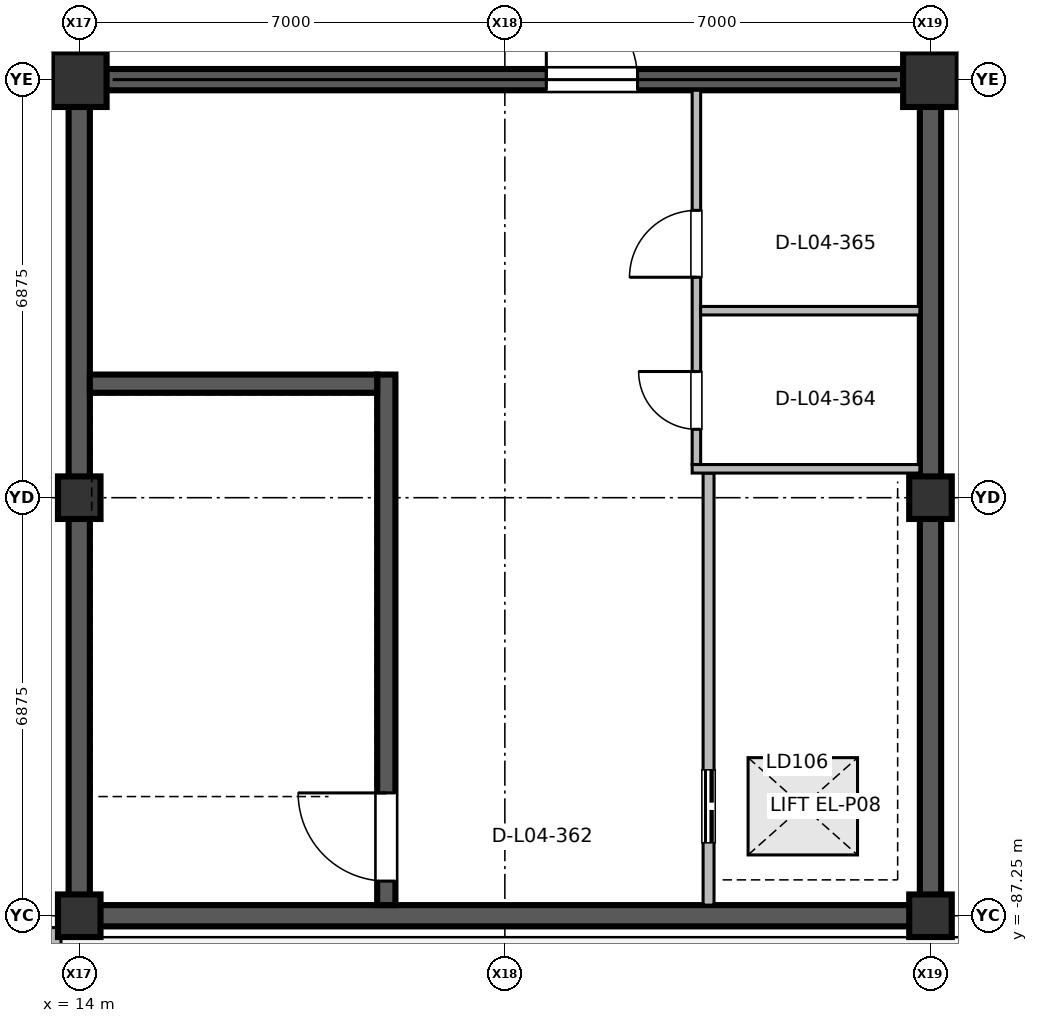
"""IFC4 building model, lengths in metres.
Left out: names, types, materials, properties, quantities, classifications, styles, units other than length and angle.
Written with IfcOpenShell. Run it as: python <this file> out.ifc"""

import sys

from ifc_helpers import new_model, si_unit, direction, frame, frame_2d, origin, origin_2d, place, context, subcontext, project, spatial, rectangle, extrude, element, fill, save


model = new_model("IFC4")
c1 = context("Model", 3, precision=1e-05, world=origin(), true_north=direction((0.0, 1.0)))
c2 = subcontext(c1, "Body", "Model", "MODEL_VIEW")
j1 = project(units=[si_unit("LENGTHUNIT", "METRE"), si_unit("PLANEANGLEUNIT", "RADIAN")], contexts=[c1])
p1 = place(None, origin())
s1 = spatial("IfcSite", under=j1, at=p1, CompositionType="ELEMENT")
p2 = place(p1, origin())
s2 = spatial("IfcBuilding", under=s1, at=p2, CompositionType="ELEMENT")
p3 = place(p2, frame((0.0, 0.0, 16.2)))
s3 = spatial("IfcBuildingStorey", under=s2, at=p3, CompositionType="ELEMENT", Elevation=16.2)
for number, where, z_axis, x_axis in (
    (1, (14.0, -87.25, 0.0), (0.0, 0.0, 1.0), (1.0, 0.0, 0.0)),
    (2, (14.0, -80.375, 0.0), (0.0, 0.0, 1.0), (1.0, 0.0, 0.0)),
):
    element("IfcColumn", number, at=place(p3, frame(where, z_axis=z_axis, x_axis=x_axis)), inside=s3, PredefinedType="COLUMN", context=c2, shape_type="SweptSolid", body=[
        extrude(rectangle(XDim=0.7, YDim=0.7, at=origin_2d()), origin(), (0.0, 0.0, 1.0), 4.595),
    ])
p4 = place(p3, frame((14.0, -73.5, 0.0), z_axis=(0.0, 0.0, 1.0), x_axis=(1.0, 0.0, 0.0)))
e3 = element("IfcColumn", 3, at=p4, inside=s3, PredefinedType="COLUMN", context=c2, shape_type="SweptSolid", body=[
    extrude(rectangle(XDim=0.9, YDim=0.9, at=origin_2d()), origin(), (0.0, 0.0, 1.0), 4.595),
])
for number, where, z_axis, x_axis in (
    (4, (28.0, -87.25, 0.0), (0.0, 0.0, 1.0), (1.0, 0.0, 0.0)),
    (5, (28.0, -80.375, 0.0), (0.0, 0.0, 1.0), (1.0, 0.0, 0.0)),
):
    element("IfcColumn", number, at=place(p3, frame(where, z_axis=z_axis, x_axis=x_axis)), inside=s3, PredefinedType="COLUMN", context=c2, shape_type="SweptSolid", body=[
        extrude(rectangle(XDim=0.7, YDim=0.7, at=origin_2d()), origin(), (0.0, 0.0, 1.0), 4.595),
    ])
p5 = place(p3, frame((28.0, -73.5, 0.0), z_axis=(0.0, 0.0, 1.0), x_axis=(1.0, 0.0, 0.0)))
e6 = element("IfcColumn", 6, at=p5, inside=s3, PredefinedType="COLUMN", context=c2, shape_type="SweptSolid", body=[
    extrude(rectangle(XDim=0.9, YDim=0.9, at=origin_2d()), origin(), (0.0, 0.0, 1.0), 4.595),
])
for number, where, z_axis, x_axis in (
    (7, (14.0, -87.075, 0.0), (0.0, 0.0, 1.0), (0.0, 1.0, 0.0)),
    (8, (28.0, -87.075, 0.0), (0.0, 0.0, 1.0), (0.0, 1.0, 0.0)),
):
    element("IfcWall", number, at=place(p3, frame(where, z_axis=z_axis, x_axis=x_axis)), inside=s3, PredefinedType="SHEAR", context=c2, shape_type="SweptSolid", body=[
        extrude(rectangle(XDim=13.4, YDim=0.35, at=frame_2d((6.7, 0.0))), origin(), (0.0, 0.0, 1.0), 4.595),
    ])
p6 = place(p3, frame((14.175, -87.25, 0.0), z_axis=(0.0, 0.0, 1.0), x_axis=(1.0, 0.0, 0.0)))
e9 = element("IfcWall", 9, at=p6, inside=s3, PredefinedType="SHEAR", context=c2, shape_type="SweptSolid", body=[
    extrude(rectangle(XDim=13.65, YDim=0.35, at=frame_2d((6.825, 0.0))), origin(), (0.0, 0.0, 1.0), 4.595),
])
p7 = place(p3, frame((14.175, -73.5, 0.0), z_axis=(0.0, 0.0, 1.0), x_axis=(1.0, 0.0, 0.0)))
e10 = element("IfcWall", 10, at=p7, inside=s3, PredefinedType="SHEAR", context=c2, shape_type="SweptSolid", body=[
    extrude(rectangle(XDim=13.65, YDim=0.35, at=frame_2d((6.825, 0.0))), origin(), (0.0, 0.0, 1.0), 4.595),
])
p8 = place(p7, frame((7.507, 0.0, 0.0)))
e11 = element("IfcOpeningElement", 11, at=p8, cuts=e10, PredefinedType="OPENING", context=c2, shape_type="SweptSolid", body=[
    extrude(rectangle(XDim=1.5, YDim=2.2, at=frame_2d((0.75, 1.1))), frame((0.0, 0.185, 0.0), z_axis=(0.0, -1.0, 0.0), x_axis=(1.0, 0.0, 0.0)), (0.0, 0.0, 1.0), 0.37),
])
p9 = place(p3, frame((0.3, -87.6, 0.0), z_axis=(0.0, 0.0, 1.0), x_axis=(1.0, 0.0, 0.0)))
e12 = element("IfcWall", 12, at=p9, inside=s3, PredefinedType="SOLIDWALL", context=c2, shape_type="SweptSolid", body=[
    extrude(rectangle(XDim=13.4, YDim=0.31, at=frame_2d((6.7, 0.0))), origin(), (0.0, 0.0, 1.0), 3.47),
])
p10 = place(p9, frame((1.2, 0.0, 0.0)))
e13 = element("IfcOpeningElement", 13, at=p10, cuts=e12, PredefinedType="OPENING", context=c2, shape_type="SweptSolid", body=[
    extrude(rectangle(XDim=2.1, YDim=2.4, at=frame_2d((1.05, 1.2))), frame((0.0, 0.165, 0.0), z_axis=(0.0, -1.0, 0.0), x_axis=(1.0, 0.0, 0.0)), (0.0, 0.0, 1.0), 0.33),
])
p11 = place(p9, frame((4.2, 0.0, 0.9)))
e14 = element("IfcOpeningElement", 14, at=p11, cuts=e12, PredefinedType="OPENING", context=c2, shape_type="SweptSolid", body=[
    extrude(rectangle(XDim=1.6, YDim=1.7, at=frame_2d((0.8, 0.85))), frame((0.0, 0.165, 0.0), z_axis=(0.0, -1.0, 0.0), x_axis=(1.0, 0.0, 0.0)), (0.0, 0.0, 1.0), 0.33),
])
p12 = place(p9, frame((6.65, 0.0, 0.9)))
e15 = element("IfcOpeningElement", 15, at=p12, cuts=e12, PredefinedType="OPENING", context=c2, shape_type="SweptSolid", body=[
    extrude(rectangle(XDim=1.7, YDim=1.85, at=frame_2d((0.85, 0.925))), frame((0.0, 0.165, 0.0), z_axis=(0.0, -1.0, 0.0), x_axis=(1.0, 0.0, 0.0)), (0.0, 0.0, 1.0), 0.33),
])
p13 = place(p3, frame((19.05, -87.075, 0.0), z_axis=(0.0, 0.0, 1.0), x_axis=(0.0, 1.0, 0.0)))
e16 = element("IfcWall", 16, at=p13, inside=s3, PredefinedType="SHEAR", context=c2, shape_type="SweptSolid", body=[
    extrude(rectangle(XDim=8.725, YDim=0.3, at=frame_2d((4.362, 0.0))), origin(), (0.0, 0.0, 1.0), 4.595),
])
p14 = place(p13, frame((0.395, 0.0, 0.0)))
e17 = element("IfcOpeningElement", 17, at=p14, cuts=e16, PredefinedType="OPENING", context=c2, shape_type="SweptSolid", body=[
    extrude(rectangle(XDim=1.45, YDim=2.2, at=frame_2d((0.725, 1.1))), frame((0.0, 0.16, 0.0), z_axis=(0.0, -1.0, 0.0), x_axis=(1.0, 0.0, 0.0)), (0.0, 0.0, 1.0), 0.32),
])
p15 = place(p3, frame((24.35, -87.075, 0.0), z_axis=(0.0, 0.0, 1.0), x_axis=(0.0, 1.0, 0.0)))
e18 = element("IfcWall", 18, at=p15, inside=s3, PredefinedType="PARTITIONING", context=c2, shape_type="SweptSolid", body=[
    extrude(rectangle(XDim=7.105, YDim=0.18, at=frame_2d((3.552, 0.0))), origin(), (0.0, 0.0, 1.0), 3.82),
])
p16 = place(p15, frame((1.025, 0.0, 0.0)))
e19 = element("IfcOpeningElement", 19, at=p16, cuts=e18, PredefinedType="OPENING", context=c2, shape_type="SweptSolid", body=[
    extrude(rectangle(XDim=1.2, YDim=2.25, at=frame_2d((0.6, 1.125))), frame((0.0, 0.1, 0.0), z_axis=(0.0, -1.0, 0.0), x_axis=(1.0, 0.0, 0.0)), (0.0, 0.0, 1.0), 0.2),
])
p17 = place(p3, frame((24.15, -79.83, 0.0), z_axis=(0.0, 0.0, 1.0), x_axis=(0.0, 1.0, 0.0)))
e20 = element("IfcWall", 20, at=p17, inside=s3, PredefinedType="PARTITIONING", context=c2, shape_type="SweptSolid", body=[
    extrude(rectangle(XDim=6.155, YDim=0.14, at=frame_2d((3.078, 0.0))), origin(), (0.0, 0.0, 1.0), 3.82),
])
p18 = place(p17, frame((0.58, 0.0, 0.0)))
e21 = element("IfcOpeningElement", 21, at=p18, cuts=e20, PredefinedType="OPENING", context=c2, shape_type="SweptSolid", body=[
    extrude(rectangle(XDim=0.95, YDim=2.15, at=frame_2d((0.475, 1.075))), frame((0.0, 0.08, 0.0), z_axis=(0.0, -1.0, 0.0), x_axis=(1.0, 0.0, 0.0)), (0.0, 0.0, 1.0), 0.16),
])
p19 = place(p17, frame((3.08, 0.0, 0.0)))
e22 = element("IfcOpeningElement", 22, at=p19, cuts=e20, PredefinedType="OPENING", context=c2, shape_type="SweptSolid", body=[
    extrude(rectangle(XDim=1.1, YDim=2.15, at=frame_2d((0.55, 1.075))), frame((0.0, 0.08, 0.0), z_axis=(0.0, -1.0, 0.0), x_axis=(1.0, 0.0, 0.0)), (0.0, 0.0, 1.0), 0.16),
])
p20 = place(p3, frame((24.08, -79.9, 0.0), z_axis=(0.0, 0.0, 1.0), x_axis=(1.0, 0.0, 0.0)))
e23 = element("IfcWall", 23, at=p20, inside=s3, PredefinedType="PARTITIONING", context=c2, shape_type="SweptSolid", body=[
    extrude(rectangle(XDim=3.745, YDim=0.14, at=frame_2d((1.873, 0.0))), origin(), (0.0, 0.0, 1.0), 3.82),
])
p21 = place(p3, frame((24.22, -77.3, 0.0), z_axis=(0.0, 0.0, 1.0), x_axis=(1.0, 0.0, 0.0)))
e24 = element("IfcWall", 24, at=p21, inside=s3, PredefinedType="PARTITIONING", context=c2, shape_type="SweptSolid", body=[
    extrude(rectangle(XDim=3.605, YDim=0.14, at=frame_2d((1.802, 0.0))), origin(), (0.0, 0.0, 1.0), 3.82),
])
p22 = place(p3, frame((14.175, -78.5, 0.0), z_axis=(0.0, 0.0, 1.0), x_axis=(1.0, 0.0, 0.0)))
e25 = element("IfcWall", 25, at=p22, inside=s3, PredefinedType="SHEAR", context=c2, shape_type="SweptSolid", body=[
    extrude(rectangle(XDim=4.725, YDim=0.3, at=frame_2d((2.362, 0.0))), origin(), (0.0, 0.0, 1.0), 4.595),
])
p23 = place(p8, origin())
e26 = element("IfcDoor", 26, at=p23, inside=s3, OperationType="SINGLE_SWING_LEFT", PredefinedType="DOOR", context=c2, shape_type="SweptSolid", body=[
    extrude(rectangle(XDim=1.5, YDim=2.2, at=frame_2d((0.75, 1.1))), frame((0.0, 0.025, 0.0), z_axis=(0.0, -1.0, 0.0), x_axis=(1.0, 0.0, 0.0)), (0.0, 0.0, 1.0), 0.05),
])
fill(e11, e26)
p24 = place(p14, origin())
e27 = element("IfcDoor", 27, at=p24, inside=s3, OperationType="SINGLE_SWING_RIGHT", PredefinedType="DOOR", context=c2, shape_type="SweptSolid", body=[
    extrude(rectangle(XDim=1.45, YDim=2.2, at=frame_2d((0.725, 1.1))), frame((0.0, 0.025, 0.0), z_axis=(0.0, -1.0, 0.0), x_axis=(1.0, 0.0, 0.0)), (0.0, 0.0, 1.0), 0.05),
])
fill(e17, e27)
p25 = place(p16, origin())
e28 = element("IfcDoor", 28, at=p25, inside=s3, OperationType="DOUBLE_DOOR_SLIDING", PredefinedType="DOOR", context=c2, shape_type="SweptSolid", body=[
    extrude(rectangle(XDim=1.2, YDim=2.25, at=frame_2d((0.6, 1.125))), frame((0.0, 0.025, 0.0), z_axis=(0.0, -1.0, 0.0), x_axis=(1.0, 0.0, 0.0)), (0.0, 0.0, 1.0), 0.05),
])
fill(e19, e28)
p26 = place(p18, origin())
e29 = element("IfcDoor", 29, at=p26, inside=s3, OperationType="SINGLE_SWING_RIGHT", PredefinedType="DOOR", context=c2, shape_type="SweptSolid", body=[
    extrude(rectangle(XDim=0.95, YDim=2.15, at=frame_2d((0.475, 1.075))), frame((0.0, 0.025, 0.0), z_axis=(0.0, -1.0, 0.0), x_axis=(1.0, 0.0, 0.0)), (0.0, 0.0, 1.0), 0.05),
])
fill(e21, e29)
p27 = place(p19, origin())
e30 = element("IfcDoor", 30, at=p27, inside=s3, OperationType="SINGLE_SWING_LEFT", PredefinedType="DOOR", context=c2, shape_type="SweptSolid", body=[
    extrude(rectangle(XDim=1.1, YDim=2.15, at=frame_2d((0.55, 1.075))), frame((0.0, 0.025, 0.0), z_axis=(0.0, -1.0, 0.0), x_axis=(1.0, 0.0, 0.0)), (0.0, 0.0, 1.0), 0.05),
])
fill(e22, e30)
save(model, sys.argv[1])
